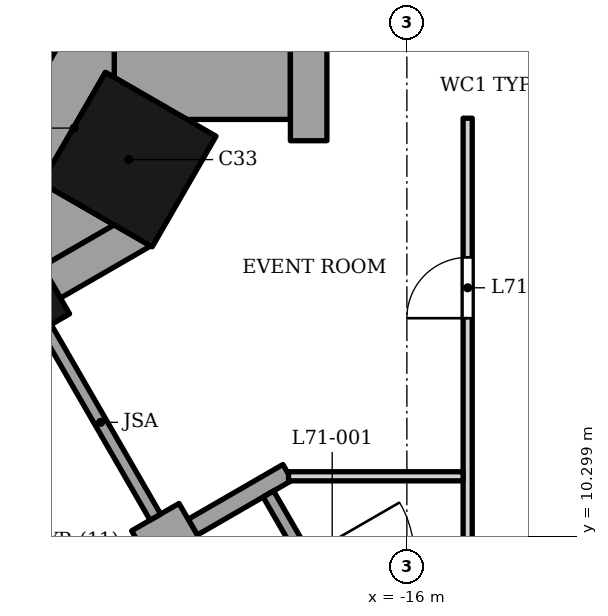
"""IFC4 building model, lengths in metres.
Left out: names, types, materials, properties, quantities, classifications, styles, units other than length and angle.
Written with IfcOpenShell. Run it as: python <this file> out.ifc"""

import sys

from ifc_helpers import new_model, si_unit, direction, frame, frame_2d, origin, origin_2d, place, context, subcontext, project, spatial, polyline, rectangle, outline, extrude, element, fill, save


model = new_model("IFC4")
c1 = context("Model", 3, precision=1e-05, world=origin(), true_north=direction((0.0, 1.0)))
c2 = subcontext(c1, "Body", "Model", "MODEL_VIEW")
j1 = project(units=[si_unit("LENGTHUNIT", "METRE"), si_unit("PLANEANGLEUNIT", "RADIAN")], contexts=[c1])
p1 = place(None, origin())
s1 = spatial("IfcSite", under=j1, at=p1, CompositionType="ELEMENT")
p2 = place(p1, origin())
s2 = spatial("IfcBuilding", under=s1, at=p2, CompositionType="ELEMENT")
p3 = place(p2, frame((0.0, 0.0, 295.0)))
s3 = spatial("IfcBuildingStorey", under=s2, at=p3, CompositionType="ELEMENT", Elevation=295.0)
p4 = place(p3, frame((-20.573, 16.492, 0.0), z_axis=(0.0, 0.0, 1.0), x_axis=(0.866025395058, -0.500000015115, 0.0)))
e1 = element("IfcColumn", 1, at=p4, inside=s3, PredefinedType="COLUMN", context=c2, shape_type="SweptSolid", body=[
    extrude(rectangle(XDim=2.1, YDim=2.1, at=origin_2d()), origin(), (0.0, 0.0, 1.0), 7.5),
])
p5 = place(p3, frame((-22.162, 14.12, 0.0), z_axis=(0.0, 0.0, 1.0), x_axis=(0.500000015115, -0.866025395058, 0.0)))
e2 = element("IfcColumn", 2, at=p5, inside=s3, PredefinedType="COLUMN", context=c2, shape_type="SweptSolid", body=[
    extrude(rectangle(XDim=0.9, YDim=0.9, at=origin_2d()), origin(), (0.0, 0.0, 1.0), 7.5),
])
p6 = place(p3, origin())
e3 = element("IfcWall", 3, at=p6, inside=s3, PredefinedType="SOLIDWALL", context=c2, shape_type="SweptSolid", body=[
    extrude(outline(polyline([(-21.997, 14.735), (-21.697, 14.215), (-20.213, 15.072), (-20.813, 15.418), (-21.997, 14.735)])), origin(), (0.0, 0.0, 1.0), 6.5),
])
p7 = place(p3, frame((-20.302, 9.998, 0.0), z_axis=(0.0, 0.0, 1.0), x_axis=(0.866013897511, 0.50001992892, 0.0)))
e4 = element("IfcWall", 4, at=p7, inside=s3, PredefinedType="SOLIDWALL", context=c2, shape_type="SweptSolid", body=[
    extrude(rectangle(XDim=0.9, YDim=0.9, at=frame_2d((0.45, 0.0))), origin(), (0.0, 0.0, 1.0), 6.5),
])
p8 = place(p3, frame((-17.963, 11.348, 0.0), z_axis=(0.0, 0.0, 1.0), x_axis=(-0.866047807691, -0.499961193289, 0.0)))
e5 = element("IfcWall", 5, at=p8, inside=s3, PredefinedType="SOLIDWALL", context=c2, shape_type="SweptSolid", body=[
    extrude(rectangle(XDim=1.8, YDim=0.3, at=frame_2d((0.9, 0.0))), origin(), (0.0, 0.0, 1.0), 6.5),
])
p9 = place(p3, frame((-21.937, 13.73, 0.0), z_axis=(0.0, 0.0, 1.0), x_axis=(0.499931829785, -0.866064758299, 0.0)))
e6 = element("IfcWall", 6, at=p9, inside=s3, PredefinedType="SOLIDWALL", context=c2, shape_type="SweptSolid", body=[
    extrude(rectangle(XDim=3.6, YDim=0.2, at=frame_2d((1.8, 0.0))), origin(), (0.0, 0.0, 1.0), 6.5),
])
p10 = place(p3, frame((-18.278, 10.993, 0.0), z_axis=(0.0, 0.0, 1.0), x_axis=(0.500002543286, -0.866023935413, 0.0)))
e7 = element("IfcWall", 7, at=p10, inside=s3, PredefinedType="ELEMENTEDWALL", context=c2, shape_type="SweptSolid", body=[
    extrude(rectangle(XDim=4.2, YDim=0.2, at=frame_2d((2.1, 0.0))), origin(), (0.0, 0.0, 1.0), 6.5),
])
p11 = place(p10, frame((1.2, 0.0, 0.0)))
e8 = element("IfcOpeningElement", 8, at=p11, cuts=e7, PredefinedType="OPENING", context=c2, shape_type="SweptSolid", body=[
    extrude(rectangle(XDim=1.8, YDim=2.7, at=frame_2d((0.9, 1.35))), frame((0.0, 0.11, 0.0), z_axis=(0.0, -1.0, 0.0), x_axis=(1.0, 0.0, 0.0)), (0.0, 0.0, 1.0), 0.22),
])
p12 = place(p3, origin())
e9 = element("IfcWall", 9, at=p12, inside=s3, PredefinedType="SOLIDWALL", context=c2, shape_type="SweptSolid", body=[
    extrude(outline(polyline([(-17.916, 18.603), (-17.916, 16.802), (-17.316, 16.802), (-17.316, 18.603), (-17.916, 18.603)])), origin(), (0.0, 0.0, 1.0), 6.5),
])
p13 = place(p3, origin())
e10 = element("IfcWall", 10, at=p13, inside=s3, PredefinedType="SOLIDWALL", context=c2, shape_type="SweptSolid", body=[
    extrude(outline(polyline([(-19.617, 17.153), (-17.916, 17.153), (-17.916, 18.603), (-17.916, 18.603), (-17.916, 19.502), (-20.813, 19.502), (-20.813, 17.843), (-19.617, 17.153)])), origin(), (0.0, 0.0, 1.0), 6.5),
])
p14 = place(p3, origin())
e11 = element("IfcWall", 11, at=p14, inside=s3, PredefinedType="SOLIDWALL", context=c2, shape_type="SweptSolid", body=[
    extrude(outline(polyline([(-20.957, 17.926), (-20.813, 17.843), (-20.813, 19.052), (-21.202, 19.278), (-23.301, 15.643), (-21.863, 14.812), (-20.813, 15.418), (-22.007, 16.108), (-20.957, 17.926)])), origin(), (0.0, 0.0, 1.0), 6.5),
])
p15 = place(p3, frame((-15.0, 5.495, 0.0), z_axis=(0.0, 0.0, 1.0), x_axis=(0.0, 1.0, 0.0)))
e12 = element("IfcWall", 12, at=p15, inside=s3, PredefinedType="PARTITIONING", context=c2, shape_type="SweptSolid", body=[
    extrude(rectangle(XDim=11.677, YDim=0.15, at=frame_2d((5.839, 0.0))), origin(), (0.0, 0.0, 1.0), 6.42),
])
p16 = place(p15, frame((8.389, 0.0, 0.0)))
e13 = element("IfcOpeningElement", 13, at=p16, cuts=e12, PredefinedType="OPENING", context=c2, shape_type="SweptSolid", body=[
    extrude(rectangle(XDim=1.0, YDim=2.1, at=frame_2d((0.5, 1.05))), frame((0.0, 0.085, 0.0), z_axis=(0.0, -1.0, 0.0), x_axis=(1.0, 0.0, 0.0)), (0.0, 0.0, 1.0), 0.17),
])
p17 = place(p15, frame((2.457, 0.0, 0.0)))
e14 = element("IfcOpeningElement", 14, at=p17, cuts=e12, PredefinedType="OPENING", context=c2, shape_type="SweptSolid", body=[
    extrude(rectangle(XDim=1.0, YDim=2.1, at=frame_2d((0.5, 1.05))), frame((0.0, 0.085, 0.0), z_axis=(0.0, -1.0, 0.0), x_axis=(1.0, 0.0, 0.0)), (0.0, 0.0, 1.0), 0.17),
])
p18 = place(p3, frame((-17.946, 11.284, 0.0), z_axis=(0.0, 0.0, 1.0), x_axis=(1.0, 0.0, 0.0)))
e15 = element("IfcWall", 15, at=p18, inside=s3, PredefinedType="PARTITIONING", context=c2, shape_type="SweptSolid", body=[
    extrude(rectangle(XDim=2.871, YDim=0.15, at=frame_2d((1.436, 0.0))), origin(), (0.0, 0.0, 1.0), 6.598),
])
p19 = place(p16, origin())
e16 = element("IfcDoor", 16, at=p19, inside=s3, OperationType="SINGLE_SWING_LEFT", PredefinedType="DOOR", context=c2, shape_type="SweptSolid", body=[
    extrude(rectangle(XDim=1.0, YDim=2.1, at=frame_2d((0.5, 1.05))), frame((0.0, 0.025, 0.0), z_axis=(0.0, -1.0, 0.0), x_axis=(1.0, 0.0, 0.0)), (0.0, 0.0, 1.0), 0.05),
])
fill(e13, e16)
save(model, sys.argv[1])
